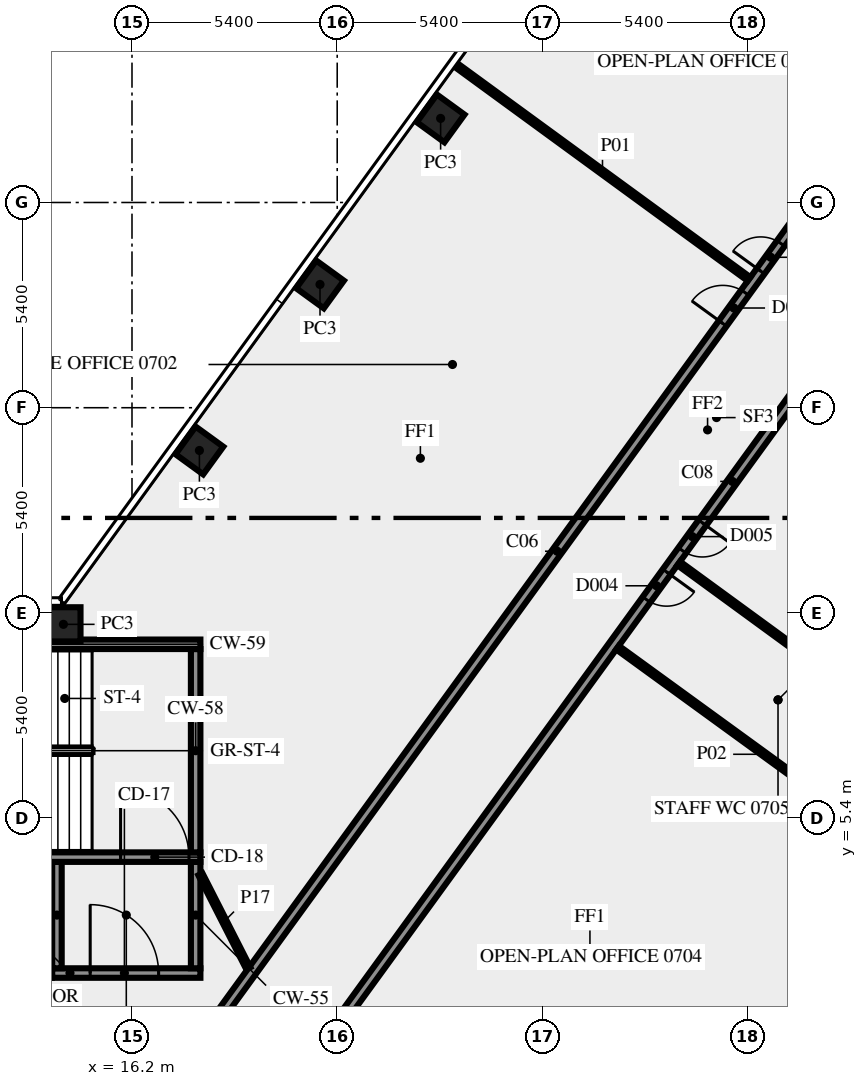
"""IFC4 building model, lengths in metres.
Left out: names, types, materials, properties, quantities, classifications, styles, units other than length and angle.
Written with IfcOpenShell. Run it as: python <this file> out.ifc"""

import sys

from ifc_helpers import new_model, si_unit, direction, frame, frame_2d, origin, origin_2d, place, context, subcontext, project, spatial, rectangle, extrude, element, fill, save


model = new_model("IFC4")
c1 = context("Model", 3, precision=1e-05, world=origin(), true_north=direction((0.0, 1.0)))
c2 = subcontext(c1, "Body", "Model", "MODEL_VIEW")
j1 = project(units=[si_unit("LENGTHUNIT", "METRE"), si_unit("PLANEANGLEUNIT", "RADIAN")], contexts=[c1])
p1 = place(None, origin())
s1 = spatial("IfcSite", under=j1, at=p1, CompositionType="ELEMENT")
p2 = place(p1, origin())
s2 = spatial("IfcBuilding", under=s1, at=p2, CompositionType="ELEMENT")
p3 = place(p2, frame((0.0, 0.0, 35.0)))
s3 = spatial("IfcBuildingStorey", under=s2, at=p3, CompositionType="ELEMENT", Elevation=35.0)
for number, where, z_axis, x_axis in (
    (1, (24.321, 23.812, 0.0), (0.0, 0.0, 1.0), (-0.588, -0.809, 0.0)),
    (2, (21.147, 19.444, 0.0), (0.0, 0.0, 1.0), (-0.588, -0.809, 0.0)),
    (3, (17.974, 15.075, 0.0), (0.0, 0.0, 1.0), (-0.588, -0.809, 0.0)),
    (4, (14.395, 10.5, 0.0), (0.0, 0.0, 1.0), (-1.0, 0.0, 0.0)),
):
    element("IfcColumn", number, at=place(p3, frame(where, z_axis=z_axis, x_axis=x_axis)), inside=s3, PredefinedType="COLUMN", context=c2, shape_type="SweptSolid", body=[
        extrude(rectangle(XDim=0.9, YDim=0.9, at=origin_2d()), origin(), (0.0, 0.0, 1.0), 3.65),
    ])
p4 = place(p3, frame((14.1, 1.325, 0.0), z_axis=(0.0, 0.0, 1.0), x_axis=(1.0, 0.0, 0.0)))
e5 = element("IfcWall", 5, at=p4, inside=s3, PredefinedType="SHEAR", context=c2, shape_type="SweptSolid", body=[
    extrude(rectangle(XDim=3.9, YDim=0.25, at=frame_2d((1.95, 0.0))), origin(), (0.0, 0.0, 1.0), 3.65),
])
p5 = place(p4, frame((1.0, 0.0, 0.0)))
e6 = element("IfcOpeningElement", 6, at=p5, cuts=e5, PredefinedType="OPENING", context=c2, shape_type="SweptSolid", body=[
    extrude(rectangle(XDim=1.8, YDim=2.1, at=frame_2d((0.9, 1.05))), frame((0.0, 0.135, 0.0), z_axis=(0.0, -1.0, 0.0), x_axis=(1.0, 0.0, 0.0)), (0.0, 0.0, 1.0), 0.27),
])
for number, where, z_axis, x_axis in (
    (7, (14.225, 1.45, 0.0), (0.0, 0.0, 1.0), (0.0, 1.0, 0.0)),
    (8, (17.875, 1.45, 0.0), (0.0, 0.0, 1.0), (0.0, 1.0, 0.0)),
):
    element("IfcWall", number, at=place(p3, frame(where, z_axis=z_axis, x_axis=x_axis)), inside=s3, PredefinedType="SHEAR", context=c2, shape_type="SweptSolid", body=[
        extrude(rectangle(XDim=2.8, YDim=0.25, at=frame_2d((1.4, 0.0))), origin(), (0.0, 0.0, 1.0), 3.65),
    ])
p6 = place(p3, frame((7.5, 4.375, 0.0), z_axis=(0.0, 0.0, 1.0), x_axis=(1.0, 0.0, 0.0)))
e9 = element("IfcWall", 9, at=p6, inside=s3, PredefinedType="SHEAR", context=c2, shape_type="SweptSolid", body=[
    extrude(rectangle(XDim=10.5, YDim=0.25, at=frame_2d((5.25, 0.0))), origin(), (0.0, 0.0, 1.0), 3.65),
])
p7 = place(p6, frame((8.4, 0.0, 0.0)))
e10 = element("IfcOpeningElement", 10, at=p7, cuts=e9, PredefinedType="OPENING", context=c2, shape_type="SweptSolid", body=[
    extrude(rectangle(XDim=1.8, YDim=2.1, at=frame_2d((0.9, 1.05))), frame((0.0, 0.135, 0.0), z_axis=(0.0, -1.0, 0.0), x_axis=(1.0, 0.0, 0.0)), (0.0, 0.0, 1.0), 0.27),
])
p8 = place(p3, frame((17.875, 4.5, 0.0), z_axis=(0.0, 0.0, 1.0), x_axis=(0.0, 1.0, 0.0)))
e11 = element("IfcWall", 11, at=p8, inside=s3, PredefinedType="SHEAR", context=c2, shape_type="SweptSolid", body=[
    extrude(rectangle(XDim=5.35, YDim=0.25, at=frame_2d((2.675, 0.0))), origin(), (0.0, 0.0, 1.0), 3.65),
])
p9 = place(p3, frame((7.5, 9.975, 0.0), z_axis=(0.0, 0.0, 1.0), x_axis=(1.0, 0.0, 0.0)))
e12 = element("IfcWall", 12, at=p9, inside=s3, PredefinedType="SHEAR", context=c2, shape_type="SweptSolid", body=[
    extrude(rectangle(XDim=10.5, YDim=0.25, at=frame_2d((5.25, 0.0))), origin(), (0.0, 0.0, 1.0), 3.65),
])
p10 = place(p9, frame((2.0, 0.0, 1.0)))
e13 = element("IfcOpeningElement", 13, at=p10, cuts=e12, PredefinedType="OPENING", context=c2, shape_type="SweptSolid", body=[
    extrude(rectangle(XDim=1.2, YDim=1.2, at=frame_2d((0.6, 0.6))), frame((0.0, 0.135, 0.0), z_axis=(0.0, -1.0, 0.0), x_axis=(1.0, 0.0, 0.0)), (0.0, 0.0, 1.0), 0.27),
])
p11 = place(p3, frame((17.545, -1.125, 0.0), z_axis=(0.0, 0.0, 1.0), x_axis=(0.587786323093, 0.809016216391, 0.0)))
e14 = element("IfcWall", 14, at=p11, inside=s3, PredefinedType="SOLIDWALL", context=c2, shape_type="SweptSolid", body=[
    extrude(rectangle(XDim=33.493, YDim=0.25, at=frame_2d((16.747, 0.0))), origin(), (0.0, 0.0, 1.0), 3.65),
])
p12 = place(p11, frame((25.857, 0.0, 0.0)))
e15 = element("IfcOpeningElement", 15, at=p12, cuts=e14, PredefinedType="OPENING", context=c2, shape_type="SweptSolid", body=[
    extrude(rectangle(XDim=0.9, YDim=2.1, at=frame_2d((0.45, 1.05))), frame((0.0, 0.135, 0.0), z_axis=(0.0, -1.0, 0.0), x_axis=(1.0, 0.0, 0.0)), (0.0, 0.0, 1.0), 0.27),
])
p13 = place(p11, frame((24.157, 0.0, 0.0)))
e16 = element("IfcOpeningElement", 16, at=p13, cuts=e14, PredefinedType="OPENING", context=c2, shape_type="SweptSolid", body=[
    extrude(rectangle(XDim=1.0, YDim=2.1, at=frame_2d((0.5, 1.05))), frame((0.0, 0.135, 0.0), z_axis=(0.0, -1.0, 0.0), x_axis=(1.0, 0.0, 0.0)), (0.0, 0.0, 1.0), 0.27),
])
p14 = place(p3, frame((43.467, 30.045, 0.0), z_axis=(0.0, 0.0, 1.0), x_axis=(-0.587784726077, -0.809017376692, 0.0)))
e17 = element("IfcWall", 17, at=p14, inside=s3, PredefinedType="SOLIDWALL", context=c2, shape_type="SweptSolid", body=[
    extrude(rectangle(XDim=39.02, YDim=0.25, at=frame_2d((19.51, 0.0))), origin(), (0.0, 0.0, 1.0), 3.65),
])
p15 = place(p14, frame((37.588, 0.0, 0.0)))
e18 = element("IfcOpeningElement", 18, at=p15, cuts=e17, PredefinedType="OPENING", context=c2, shape_type="SweptSolid", body=[
    extrude(rectangle(XDim=0.9, YDim=2.1, at=frame_2d((0.45, 1.05))), frame((0.0, 0.135, 0.0), z_axis=(0.0, -1.0, 0.0), x_axis=(1.0, 0.0, 0.0)), (0.0, 0.0, 1.0), 0.27),
])
p16 = place(p14, frame((20.855, 0.0, 0.0)))
e19 = element("IfcOpeningElement", 19, at=p16, cuts=e17, PredefinedType="OPENING", context=c2, shape_type="SweptSolid", body=[
    extrude(rectangle(XDim=0.9, YDim=2.1, at=frame_2d((0.45, 1.05))), frame((0.0, 0.135, 0.0), z_axis=(0.0, -1.0, 0.0), x_axis=(1.0, 0.0, 0.0)), (0.0, 0.0, 1.0), 0.27),
])
p17 = place(p14, frame((7.355, 0.0, 0.0)))
e20 = element("IfcOpeningElement", 20, at=p17, cuts=e17, PredefinedType="OPENING", context=c2, shape_type="SweptSolid", body=[
    extrude(rectangle(XDim=0.9, YDim=2.1, at=frame_2d((0.45, 1.05))), frame((0.0, 0.135, 0.0), z_axis=(0.0, -1.0, 0.0), x_axis=(1.0, 0.0, 0.0)), (0.0, 0.0, 1.0), 0.27),
])
p18 = place(p14, frame((11.404, 0.0, 0.0)))
e21 = element("IfcOpeningElement", 21, at=p18, cuts=e17, PredefinedType="OPENING", context=c2, shape_type="SweptSolid", body=[
    extrude(rectangle(XDim=0.9, YDim=2.1, at=frame_2d((0.45, 1.05))), frame((0.0, 0.135, 0.0), z_axis=(0.0, -1.0, 0.0), x_axis=(1.0, 0.0, 0.0)), (0.0, 0.0, 1.0), 0.27),
])
p19 = place(p14, frame((0.604, 0.0, 0.0)))
e22 = element("IfcOpeningElement", 22, at=p19, cuts=e17, PredefinedType="OPENING", context=c2, shape_type="SweptSolid", body=[
    extrude(rectangle(XDim=0.9, YDim=2.1, at=frame_2d((0.45, 1.05))), frame((0.0, 0.135, 0.0), z_axis=(0.0, -1.0, 0.0), x_axis=(1.0, 0.0, 0.0)), (0.0, 0.0, 1.0), 0.27),
])
p20 = place(p14, frame((22.455, 0.0, 0.0)))
e23 = element("IfcOpeningElement", 23, at=p20, cuts=e17, PredefinedType="OPENING", context=c2, shape_type="SweptSolid", body=[
    extrude(rectangle(XDim=0.9, YDim=2.1, at=frame_2d((0.45, 1.05))), frame((0.0, 0.135, 0.0), z_axis=(0.0, -1.0, 0.0), x_axis=(1.0, 0.0, 0.0)), (0.0, 0.0, 1.0), 0.27),
])
p21 = place(p3, frame((24.724, 25.217, 0.0), z_axis=(0.0, 0.0, 1.0), x_axis=(0.807606997933, -0.589721067023, 0.0)))
e24 = element("IfcWall", 24, at=p21, inside=s3, PredefinedType="PARTITIONING", context=c2, shape_type="SweptSolid", body=[
    extrude(rectangle(XDim=9.55, YDim=0.12, at=frame_2d((4.775, 0.0))), origin(), (0.0, 0.0, 1.0), 2.75),
])
p22 = place(p3, frame((36.702, 4.274, 0.0), z_axis=(0.0, 0.0, 1.0), x_axis=(-0.808998008689, 0.58781138296, 0.0)))
e25 = element("IfcWall", 25, at=p22, inside=s3, PredefinedType="PARTITIONING", context=c2, shape_type="SweptSolid", body=[
    extrude(rectangle(XDim=9.55, YDim=0.12, at=frame_2d((4.775, 0.0))), origin(), (0.0, 0.0, 1.0), 2.75),
])
p23 = place(p3, frame((30.587, 12.104, 0.0), z_axis=(0.0, 0.0, 1.0), x_axis=(0.807590933527, -0.589743066161, 0.0)))
e26 = element("IfcWall", 26, at=p23, inside=s3, PredefinedType="PARTITIONING", context=c2, shape_type="SweptSolid", body=[
    extrude(rectangle(XDim=8.594, YDim=0.12, at=frame_2d((4.297, 0.0))), origin(), (0.0, 0.0, 1.0), 3.65),
])
p24 = place(p3, frame((18.0, 3.925, 0.0), z_axis=(0.0, 0.0, 1.0), x_axis=(0.453950796792, -0.891026752736, 0.0)))
e27 = element("IfcWall", 27, at=p24, inside=s3, PredefinedType="PARTITIONING", context=c2, shape_type="SweptSolid", body=[
    extrude(rectangle(XDim=2.778, YDim=0.12, at=frame_2d((1.389, 0.0))), origin(), (0.0, 0.0, 1.0), 3.65),
])
p25 = place(p5, origin())
e28 = element("IfcDoor", 28, at=p25, inside=s3, OperationType="DOUBLE_DOOR_SINGLE_SWING", PredefinedType="DOOR", context=c2, shape_type="SweptSolid", body=[
    extrude(rectangle(XDim=1.8, YDim=2.1, at=frame_2d((0.9, 1.05))), frame((0.0, 0.025, 0.0), z_axis=(0.0, -1.0, 0.0), x_axis=(1.0, 0.0, 0.0)), (0.0, 0.0, 1.0), 0.05),
])
fill(e6, e28)
p26 = place(p7, origin())
e29 = element("IfcDoor", 29, at=p26, inside=s3, OperationType="DOUBLE_DOOR_SINGLE_SWING", PredefinedType="DOOR", context=c2, shape_type="SweptSolid", body=[
    extrude(rectangle(XDim=1.8, YDim=2.1, at=frame_2d((0.9, 1.05))), frame((0.0, 0.025, 0.0), z_axis=(0.0, -1.0, 0.0), x_axis=(1.0, 0.0, 0.0)), (0.0, 0.0, 1.0), 0.05),
])
fill(e10, e29)
p27 = place(p12, origin())
e30 = element("IfcDoor", 30, at=p27, inside=s3, OperationType="SINGLE_SWING_LEFT", PredefinedType="DOOR", context=c2, shape_type="SweptSolid", body=[
    extrude(rectangle(XDim=0.9, YDim=2.1, at=frame_2d((0.45, 1.05))), frame((0.0, 0.025, 0.0), z_axis=(0.0, -1.0, 0.0), x_axis=(1.0, 0.0, 0.0)), (0.0, 0.0, 1.0), 0.05),
])
fill(e15, e30)
p28 = place(p16, origin())
e31 = element("IfcDoor", 31, at=p28, inside=s3, OperationType="SINGLE_SWING_RIGHT", PredefinedType="DOOR", context=c2, shape_type="SweptSolid", body=[
    extrude(rectangle(XDim=0.9, YDim=2.1, at=frame_2d((0.45, 1.05))), frame((0.0, 0.025, 0.0), z_axis=(0.0, -1.0, 0.0), x_axis=(1.0, 0.0, 0.0)), (0.0, 0.0, 1.0), 0.05),
])
fill(e19, e31)
p29 = place(p13, origin())
e32 = element("IfcDoor", 32, at=p29, inside=s3, OperationType="SINGLE_SWING_RIGHT", PredefinedType="DOOR", context=c2, shape_type="SweptSolid", body=[
    extrude(rectangle(XDim=1.0, YDim=2.1, at=frame_2d((0.5, 1.05))), frame((0.0, 0.025, 0.0), z_axis=(0.0, -1.0, 0.0), x_axis=(1.0, 0.0, 0.0)), (0.0, 0.0, 1.0), 0.05),
])
fill(e16, e32)
p30 = place(p20, origin())
e33 = element("IfcDoor", 33, at=p30, inside=s3, OperationType="SINGLE_SWING_LEFT", PredefinedType="DOOR", context=c2, shape_type="SweptSolid", body=[
    extrude(rectangle(XDim=0.9, YDim=2.1, at=frame_2d((0.45, 1.05))), frame((0.0, 0.025, 0.0), z_axis=(0.0, -1.0, 0.0), x_axis=(1.0, 0.0, 0.0)), (0.0, 0.0, 1.0), 0.05),
])
fill(e23, e33)
save(model, sys.argv[1])
